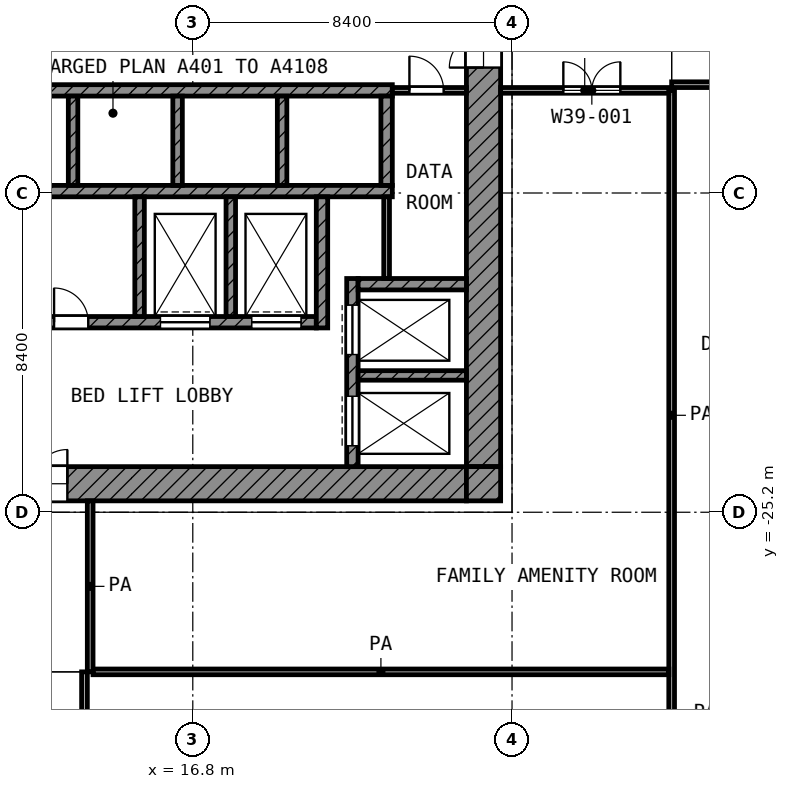
"""IFC4 building model, lengths in metres.
Left out: names, types, materials, properties, quantities, classifications, styles, units other than length and angle.
Written with IfcOpenShell. Run it as: python <this file> out.ifc"""

import sys

from ifc_helpers import new_model, si_unit, direction, frame, frame_2d, origin, place, context, subcontext, project, spatial, rectangle, extrude, element, fill, save


model = new_model("IFC4")
c1 = context("Model", 3, precision=1e-05, world=origin(), true_north=direction((0.0, 1.0)))
c2 = subcontext(c1, "Body", "Model", "MODEL_VIEW")
j1 = project(units=[si_unit("LENGTHUNIT", "METRE"), si_unit("PLANEANGLEUNIT", "RADIAN")], contexts=[c1])
p1 = place(None, origin())
s1 = spatial("IfcSite", under=j1, at=p1, CompositionType="ELEMENT")
p2 = place(p1, origin())
s2 = spatial("IfcBuilding", under=s1, at=p2, CompositionType="ELEMENT")
p3 = place(p2, frame((0.0, 0.0, 192.0)))
s3 = spatial("IfcBuildingStorey", under=s2, at=p3, CompositionType="ELEMENT", Elevation=192.0)
p4 = place(p3, frame((24.45, -24.0, 0.0), z_axis=(0.0, 0.0, 1.0), x_axis=(0.0, 1.0, 0.0)))
e1 = element("IfcWall", 1, at=p4, inside=s3, PredefinedType="SHEAR", context=c2, shape_type="SweptSolid", body=[
    extrude(rectangle(XDim=18.6, YDim=0.9, at=frame_2d((9.3, 0.0))), origin(), (0.0, 0.0, 1.0), 3.6),
])
p5 = place(p4, frame((10.5, 0.0, 0.0)))
e2 = element("IfcOpeningElement", 2, at=p5, cuts=e1, PredefinedType="OPENING", context=c2, shape_type="SweptSolid", body=[
    extrude(rectangle(XDim=1.8, YDim=2.1, at=frame_2d((0.9, 1.05))), frame((0.0, 0.46, 0.0), z_axis=(0.0, -1.0, 0.0), x_axis=(1.0, 0.0, 0.0)), (0.0, 0.0, 1.0), 0.92),
])
p6 = place(p3, frame((5.4, -24.45, 0.0), z_axis=(0.0, 0.0, 1.0), x_axis=(1.0, 0.0, 0.0)))
e3 = element("IfcWall", 3, at=p6, inside=s3, PredefinedType="SHEAR", context=c2, shape_type="SweptSolid", body=[
    extrude(rectangle(XDim=18.6, YDim=0.9, at=frame_2d((9.3, 0.0))), origin(), (0.0, 0.0, 1.0), 3.6),
])
p7 = place(p6, frame((6.3, 0.0, 0.0)))
e4 = element("IfcOpeningElement", 4, at=p7, cuts=e3, PredefinedType="OPENING", context=c2, shape_type="SweptSolid", body=[
    extrude(rectangle(XDim=1.8, YDim=2.1, at=frame_2d((0.9, 1.05))), frame((0.0, 0.46, 0.0), z_axis=(0.0, -1.0, 0.0), x_axis=(1.0, 0.0, 0.0)), (0.0, 0.0, 1.0), 0.92),
])
p8 = place(p3, frame((24.45, -24.9, 0.0), z_axis=(0.0, 0.0, 1.0), x_axis=(0.0, 1.0, 0.0)))
e5 = element("IfcWall", 5, at=p8, inside=s3, PredefinedType="SHEAR", context=c2, shape_type="SweptSolid", body=[
    extrude(rectangle(XDim=0.9, YDim=0.9, at=frame_2d((0.45, 0.0))), origin(), (0.0, 0.0, 1.0), 3.6),
])
p9 = place(p3, frame((5.4, -14.1, 0.0), z_axis=(0.0, 0.0, 1.0), x_axis=(1.0, 0.0, 0.0)))
e6 = element("IfcWall", 6, at=p9, inside=s3, PredefinedType="SHEAR", context=c2, shape_type="SweptSolid", body=[
    extrude(rectangle(XDim=16.65, YDim=0.3, at=frame_2d((8.325, 0.0))), origin(), (0.0, 0.0, 1.0), 3.6),
])
p10 = place(p9, frame((0.825, 0.0, 0.0)))
e7 = element("IfcOpeningElement", 7, at=p10, cuts=e6, PredefinedType="OPENING", context=c2, shape_type="SweptSolid", body=[
    extrude(rectangle(XDim=1.1, YDim=2.1, at=frame_2d((0.55, 1.05))), frame((0.0, 0.16, 0.0), z_axis=(0.0, -1.0, 0.0), x_axis=(1.0, 0.0, 0.0)), (0.0, 0.0, 1.0), 0.32),
])
p11 = place(p9, frame((3.575, 0.0, 0.0)))
e8 = element("IfcOpeningElement", 8, at=p11, cuts=e6, PredefinedType="OPENING", context=c2, shape_type="SweptSolid", body=[
    extrude(rectangle(XDim=1.1, YDim=2.1, at=frame_2d((0.55, 1.05))), frame((0.0, 0.16, 0.0), z_axis=(0.0, -1.0, 0.0), x_axis=(1.0, 0.0, 0.0)), (0.0, 0.0, 1.0), 0.32),
])
p12 = place(p3, frame((5.4, -16.75, 0.0), z_axis=(0.0, 0.0, 1.0), x_axis=(1.0, 0.0, 0.0)))
e9 = element("IfcWall", 9, at=p12, inside=s3, PredefinedType="SHEAR", context=c2, shape_type="SweptSolid", body=[
    extrude(rectangle(XDim=16.65, YDim=0.3, at=frame_2d((8.325, 0.0))), origin(), (0.0, 0.0, 1.0), 3.6),
])
p13 = place(p3, frame((5.4, -20.2, 0.0), z_axis=(0.0, 0.0, 1.0), x_axis=(1.0, 0.0, 0.0)))
e10 = element("IfcWall", 10, at=p13, inside=s3, PredefinedType="SHEAR", context=c2, shape_type="SweptSolid", body=[
    extrude(rectangle(XDim=14.65, YDim=0.3, at=frame_2d((7.325, 0.0))), origin(), (0.0, 0.0, 1.0), 3.6),
])
p14 = place(p13, frame((10.55, 0.0, 0.0)))
e11 = element("IfcOpeningElement", 11, at=p14, cuts=e10, PredefinedType="OPENING", context=c2, shape_type="SweptSolid", body=[
    extrude(rectangle(XDim=1.3, YDim=2.1, at=frame_2d((0.65, 1.05))), frame((0.0, 0.16, 0.0), z_axis=(0.0, -1.0, 0.0), x_axis=(1.0, 0.0, 0.0)), (0.0, 0.0, 1.0), 0.32),
])
p15 = place(p13, frame((12.95, 0.0, 0.0)))
e12 = element("IfcOpeningElement", 12, at=p15, cuts=e10, PredefinedType="OPENING", context=c2, shape_type="SweptSolid", body=[
    extrude(rectangle(XDim=1.3, YDim=2.1, at=frame_2d((0.65, 1.05))), frame((0.0, 0.16, 0.0), z_axis=(0.0, -1.0, 0.0), x_axis=(1.0, 0.0, 0.0)), (0.0, 0.0, 1.0), 0.32),
])
p16 = place(p13, frame((0.55, 0.0, 0.0)))
e13 = element("IfcOpeningElement", 13, at=p16, cuts=e10, PredefinedType="OPENING", context=c2, shape_type="SweptSolid", body=[
    extrude(rectangle(XDim=1.3, YDim=2.1, at=frame_2d((0.65, 1.05))), frame((0.0, 0.16, 0.0), z_axis=(0.0, -1.0, 0.0), x_axis=(1.0, 0.0, 0.0)), (0.0, 0.0, 1.0), 0.32),
])
p17 = place(p13, frame((2.95, 0.0, 0.0)))
e14 = element("IfcOpeningElement", 14, at=p17, cuts=e10, PredefinedType="OPENING", context=c2, shape_type="SweptSolid", body=[
    extrude(rectangle(XDim=1.3, YDim=2.1, at=frame_2d((0.65, 1.05))), frame((0.0, 0.16, 0.0), z_axis=(0.0, -1.0, 0.0), x_axis=(1.0, 0.0, 0.0)), (0.0, 0.0, 1.0), 0.32),
])
p18 = place(p13, frame((5.35, 0.0, 0.0)))
e15 = element("IfcOpeningElement", 15, at=p18, cuts=e10, PredefinedType="OPENING", context=c2, shape_type="SweptSolid", body=[
    extrude(rectangle(XDim=0.9, YDim=2.1, at=frame_2d((0.45, 1.05))), frame((0.0, 0.16, 0.0), z_axis=(0.0, -1.0, 0.0), x_axis=(1.0, 0.0, 0.0)), (0.0, 0.0, 1.0), 0.32),
])
p19 = place(p13, frame((7.75, 0.0, 0.0)))
e16 = element("IfcOpeningElement", 16, at=p19, cuts=e10, PredefinedType="OPENING", context=c2, shape_type="SweptSolid", body=[
    extrude(rectangle(XDim=0.9, YDim=2.1, at=frame_2d((0.45, 1.05))), frame((0.0, 0.16, 0.0), z_axis=(0.0, -1.0, 0.0), x_axis=(1.0, 0.0, 0.0)), (0.0, 0.0, 1.0), 0.32),
])
p20 = place(p3, frame((20.2, -20.35, 0.0), z_axis=(0.0, 0.0, 1.0), x_axis=(0.0, 1.0, 0.0)))
e17 = element("IfcWall", 17, at=p20, inside=s3, PredefinedType="SHEAR", context=c2, shape_type="SweptSolid", body=[
    extrude(rectangle(XDim=3.45, YDim=0.3, at=frame_2d((1.725, 0.0))), origin(), (0.0, 0.0, 1.0), 3.6),
])
p21 = place(p3, frame((21.9, -16.6, 0.0), z_axis=(0.0, 0.0, 1.0), x_axis=(0.0, 1.0, 0.0)))
e18 = element("IfcWall", 18, at=p21, inside=s3, PredefinedType="SHEAR", context=c2, shape_type="SweptSolid", body=[
    extrude(rectangle(XDim=2.35, YDim=0.3, at=frame_2d((1.175, 0.0))), origin(), (0.0, 0.0, 1.0), 3.6),
])
p22 = place(p3, frame((21.15, -19.2, 0.0), z_axis=(0.0, 0.0, 1.0), x_axis=(1.0, 0.0, 0.0)))
e19 = element("IfcWall", 19, at=p22, inside=s3, PredefinedType="SHEAR", context=c2, shape_type="SweptSolid", body=[
    extrude(rectangle(XDim=2.85, YDim=0.3, at=frame_2d((1.425, 0.0))), origin(), (0.0, 0.0, 1.0), 3.6),
])
p23 = place(p3, frame((21.0, -24.0, 0.0), z_axis=(0.0, 0.0, 1.0), x_axis=(0.0, 1.0, 0.0)))
e20 = element("IfcWall", 20, at=p23, inside=s3, PredefinedType="SHEAR", context=c2, shape_type="SweptSolid", body=[
    extrude(rectangle(XDim=4.95, YDim=0.3, at=frame_2d((2.475, 0.0))), origin(), (0.0, 0.0, 1.0), 3.6),
])
p24 = place(p23, frame((2.95, 0.0, 0.0)))
e21 = element("IfcOpeningElement", 21, at=p24, cuts=e20, PredefinedType="OPENING", context=c2, shape_type="SweptSolid", body=[
    extrude(rectangle(XDim=1.3, YDim=2.1, at=frame_2d((0.65, 1.05))), frame((0.0, 0.16, 0.0), z_axis=(0.0, -1.0, 0.0), x_axis=(1.0, 0.0, 0.0)), (0.0, 0.0, 1.0), 0.32),
])
p25 = place(p23, frame((0.55, 0.0, 0.0)))
e22 = element("IfcOpeningElement", 22, at=p25, cuts=e20, PredefinedType="OPENING", context=c2, shape_type="SweptSolid", body=[
    extrude(rectangle(XDim=1.3, YDim=2.1, at=frame_2d((0.65, 1.05))), frame((0.0, 0.16, 0.0), z_axis=(0.0, -1.0, 0.0), x_axis=(1.0, 0.0, 0.0)), (0.0, 0.0, 1.0), 0.32),
])
p26 = place(p3, frame((21.15, -21.6, 0.0), z_axis=(0.0, 0.0, 1.0), x_axis=(1.0, 0.0, 0.0)))
e23 = element("IfcWall", 23, at=p26, inside=s3, PredefinedType="SHEAR", context=c2, shape_type="SweptSolid", body=[
    extrude(rectangle(XDim=2.85, YDim=0.25, at=frame_2d((1.425, 0.0))), origin(), (0.0, 0.0, 1.0), 3.6),
])
for number, where, z_axis, x_axis in (
    (24, (15.4, -20.05, 0.0), (0.0, 0.0, 1.0), (0.0, 1.0, 0.0)),
    (25, (17.8, -20.05, 0.0), (0.0, 0.0, 1.0), (0.0, 1.0, 0.0)),
):
    element("IfcWall", number, at=place(p3, frame(where, z_axis=z_axis, x_axis=x_axis)), inside=s3, PredefinedType="SHEAR", context=c2, shape_type="SweptSolid", body=[
        extrude(rectangle(XDim=3.15, YDim=0.25, at=frame_2d((1.575, 0.0))), origin(), (0.0, 0.0, 1.0), 3.6),
    ])
for number, where, z_axis, x_axis in (
    (26, (13.65, -16.6, 0.0), (0.0, 0.0, 1.0), (0.0, 1.0, 0.0)),
    (27, (16.4, -16.6, 0.0), (0.0, 0.0, 1.0), (0.0, 1.0, 0.0)),
    (28, (19.15, -16.6, 0.0), (0.0, 0.0, 1.0), (0.0, 1.0, 0.0)),
):
    element("IfcWall", number, at=place(p3, frame(where, z_axis=z_axis, x_axis=x_axis)), inside=s3, PredefinedType="SHEAR", context=c2, shape_type="SweptSolid", body=[
        extrude(rectangle(XDim=2.35, YDim=0.25, at=frame_2d((1.175, 0.0))), origin(), (0.0, 0.0, 1.0), 3.6),
    ])
p27 = place(p3, frame((21.9, -19.05, 0.0), z_axis=(0.0, 0.0, 1.0), x_axis=(0.0, 1.0, 0.0)))
e29 = element("IfcWall", 29, at=p27, inside=s3, PredefinedType="PARTITIONING", context=c2, shape_type="SweptSolid", body=[
    extrude(rectangle(XDim=2.15, YDim=0.15, at=frame_2d((1.075, 0.0))), origin(), (0.0, 0.0, 1.0), 3.6),
])
p28 = place(p3, frame((22.05, -14.1, 0.0), z_axis=(0.0, 0.0, 1.0), x_axis=(1.0, 0.0, 0.0)))
e30 = element("IfcWall", 30, at=p28, inside=s3, PredefinedType="PARTITIONING", context=c2, shape_type="SweptSolid", body=[
    extrude(rectangle(XDim=1.95, YDim=0.15, at=frame_2d((0.975, 0.0))), origin(), (0.0, 0.0, 1.0), 3.6),
])
p29 = place(p28, frame((0.45, 0.0, 0.0)))
e31 = element("IfcOpeningElement", 31, at=p29, cuts=e30, PredefinedType="OPENING", context=c2, shape_type="SweptSolid", body=[
    extrude(rectangle(XDim=0.9, YDim=2.1, at=frame_2d((0.45, 1.05))), frame((0.0, 0.085, 0.0), z_axis=(0.0, -1.0, 0.0), x_axis=(1.0, 0.0, 0.0)), (0.0, 0.0, 1.0), 0.17),
])
p30 = place(p3, frame((14.175, -29.4, 0.0), z_axis=(0.0, 0.0, 1.0), x_axis=(1.0, 0.0, 0.0)))
e32 = element("IfcWall", 32, at=p30, inside=s3, PredefinedType="PARTITIONING", context=c2, shape_type="SweptSolid", body=[
    extrude(rectangle(XDim=15.15, YDim=0.15, at=frame_2d((7.575, 0.0))), origin(), (0.0, 0.0, 1.0), 3.6),
])
p31 = place(p3, frame((24.9, -14.1, 0.0), z_axis=(0.0, 0.0, 1.0), x_axis=(1.0, 0.0, 0.0)))
e33 = element("IfcWall", 33, at=p31, inside=s3, PredefinedType="PARTITIONING", context=c2, shape_type="SweptSolid", body=[
    extrude(rectangle(XDim=4.425, YDim=0.15, at=frame_2d((2.212, 0.0))), origin(), (0.0, 0.0, 1.0), 3.6),
])
p32 = place(p31, frame((1.65, 0.0, 0.0)))
e34 = element("IfcOpeningElement", 34, at=p32, cuts=e33, PredefinedType="OPENING", context=c2, shape_type="SweptSolid", body=[
    extrude(rectangle(XDim=1.5, YDim=2.1, at=frame_2d((0.75, 1.05))), frame((0.0, 0.085, 0.0), z_axis=(0.0, -1.0, 0.0), x_axis=(1.0, 0.0, 0.0)), (0.0, 0.0, 1.0), 0.17),
])
p33 = place(p3, frame((29.4, -13.95, 0.0), z_axis=(0.0, 0.0, 1.0), x_axis=(1.0, 0.0, 0.0)))
e35 = element("IfcWall", 35, at=p33, inside=s3, PredefinedType="PARTITIONING", context=c2, shape_type="SweptSolid", body=[
    extrude(rectangle(XDim=37.72, YDim=0.15, at=frame_2d((18.86, 0.0))), origin(), (0.0, 0.0, 1.0), 3.6),
])
p34 = place(p33, frame((1.6, 0.0, 0.0)))
e36 = element("IfcOpeningElement", 36, at=p34, cuts=e35, PredefinedType="OPENING", context=c2, shape_type="SweptSolid", body=[
    extrude(rectangle(XDim=1.0, YDim=2.1, at=frame_2d((0.5, 1.05))), frame((0.0, 0.085, 0.0), z_axis=(0.0, -1.0, 0.0), x_axis=(1.0, 0.0, 0.0)), (0.0, 0.0, 1.0), 0.17),
])
p35 = place(p33, frame((5.55, 0.0, 0.0)))
e37 = element("IfcOpeningElement", 37, at=p35, cuts=e35, PredefinedType="OPENING", context=c2, shape_type="SweptSolid", body=[
    extrude(rectangle(XDim=1.2, YDim=2.1, at=frame_2d((0.6, 1.05))), frame((0.0, 0.085, 0.0), z_axis=(0.0, -1.0, 0.0), x_axis=(1.0, 0.0, 0.0)), (0.0, 0.0, 1.0), 0.17),
])
p36 = place(p33, frame((11.2, 0.0, 0.0)))
e38 = element("IfcOpeningElement", 38, at=p36, cuts=e35, PredefinedType="OPENING", context=c2, shape_type="SweptSolid", body=[
    extrude(rectangle(XDim=1.2, YDim=2.1, at=frame_2d((0.6, 1.05))), frame((0.0, 0.085, 0.0), z_axis=(0.0, -1.0, 0.0), x_axis=(1.0, 0.0, 0.0)), (0.0, 0.0, 1.0), 0.17),
])
p37 = place(p33, frame((14.35, 0.0, 0.0)))
e39 = element("IfcOpeningElement", 39, at=p37, cuts=e35, PredefinedType="OPENING", context=c2, shape_type="SweptSolid", body=[
    extrude(rectangle(XDim=1.0, YDim=2.1, at=frame_2d((0.5, 1.05))), frame((0.0, 0.085, 0.0), z_axis=(0.0, -1.0, 0.0), x_axis=(1.0, 0.0, 0.0)), (0.0, 0.0, 1.0), 0.17),
])
p38 = place(p33, frame((19.6, 0.0, 0.0)))
e40 = element("IfcOpeningElement", 40, at=p38, cuts=e35, PredefinedType="OPENING", context=c2, shape_type="SweptSolid", body=[
    extrude(rectangle(XDim=1.2, YDim=2.1, at=frame_2d((0.6, 1.05))), frame((0.0, 0.085, 0.0), z_axis=(0.0, -1.0, 0.0), x_axis=(1.0, 0.0, 0.0)), (0.0, 0.0, 1.0), 0.17),
])
p39 = place(p33, frame((21.2, 0.0, 0.0)))
e41 = element("IfcOpeningElement", 41, at=p39, cuts=e35, PredefinedType="OPENING", context=c2, shape_type="SweptSolid", body=[
    extrude(rectangle(XDim=1.1, YDim=2.1, at=frame_2d((0.55, 1.05))), frame((0.0, 0.085, 0.0), z_axis=(0.0, -1.0, 0.0), x_axis=(1.0, 0.0, 0.0)), (0.0, 0.0, 1.0), 0.17),
])
p40 = place(p33, frame((27.9, 0.0, 0.0)))
e42 = element("IfcOpeningElement", 42, at=p40, cuts=e35, PredefinedType="OPENING", context=c2, shape_type="SweptSolid", body=[
    extrude(rectangle(XDim=1.2, YDim=2.1, at=frame_2d((0.6, 1.05))), frame((0.0, 0.085, 0.0), z_axis=(0.0, -1.0, 0.0), x_axis=(1.0, 0.0, 0.0)), (0.0, 0.0, 1.0), 0.17),
])
p41 = place(p33, frame((31.0, 0.0, 0.0)))
e43 = element("IfcOpeningElement", 43, at=p41, cuts=e35, PredefinedType="OPENING", context=c2, shape_type="SweptSolid", body=[
    extrude(rectangle(XDim=1.0, YDim=2.1, at=frame_2d((0.5, 1.05))), frame((0.0, 0.085, 0.0), z_axis=(0.0, -1.0, 0.0), x_axis=(1.0, 0.0, 0.0)), (0.0, 0.0, 1.0), 0.17),
])
p42 = place(p33, frame((35.2, 0.0, 0.0)))
e44 = element("IfcOpeningElement", 44, at=p42, cuts=e35, PredefinedType="OPENING", context=c2, shape_type="SweptSolid", body=[
    extrude(rectangle(XDim=1.0, YDim=2.1, at=frame_2d((0.5, 1.05))), frame((0.0, 0.085, 0.0), z_axis=(0.0, -1.0, 0.0), x_axis=(1.0, 0.0, 0.0)), (0.0, 0.0, 1.0), 0.17),
])
p43 = place(p3, frame((13.95, -54.52, 0.0), z_axis=(0.0, 0.0, 1.0), x_axis=(0.0, 1.0, 0.0)))
e45 = element("IfcWall", 45, at=p43, inside=s3, PredefinedType="PARTITIONING", context=c2, shape_type="SweptSolid", body=[
    extrude(rectangle(XDim=25.12, YDim=0.15, at=frame_2d((12.56, 0.0))), origin(), (0.0, 0.0, 1.0), 3.6),
])
p44 = place(p43, frame((22.52, 0.0, 0.0)))
e46 = element("IfcOpeningElement", 46, at=p44, cuts=e45, PredefinedType="OPENING", context=c2, shape_type="SweptSolid", body=[
    extrude(rectangle(XDim=1.0, YDim=2.1, at=frame_2d((0.5, 1.05))), frame((0.0, 0.085, 0.0), z_axis=(0.0, -1.0, 0.0), x_axis=(1.0, 0.0, 0.0)), (0.0, 0.0, 1.0), 0.17),
])
p45 = place(p43, frame((18.37, 0.0, 0.0)))
e47 = element("IfcOpeningElement", 47, at=p45, cuts=e45, PredefinedType="OPENING", context=c2, shape_type="SweptSolid", body=[
    extrude(rectangle(XDim=1.2, YDim=2.1, at=frame_2d((0.6, 1.05))), frame((0.0, 0.085, 0.0), z_axis=(0.0, -1.0, 0.0), x_axis=(1.0, 0.0, 0.0)), (0.0, 0.0, 1.0), 0.17),
])
p46 = place(p43, frame((13.52, 0.0, 0.0)))
e48 = element("IfcOpeningElement", 48, at=p46, cuts=e45, PredefinedType="OPENING", context=c2, shape_type="SweptSolid", body=[
    extrude(rectangle(XDim=1.2, YDim=2.1, at=frame_2d((0.6, 1.05))), frame((0.0, 0.085, 0.0), z_axis=(0.0, -1.0, 0.0), x_axis=(1.0, 0.0, 0.0)), (0.0, 0.0, 1.0), 0.17),
])
p47 = place(p43, frame((11.12, 0.0, 0.0)))
e49 = element("IfcOpeningElement", 49, at=p47, cuts=e45, PredefinedType="OPENING", context=c2, shape_type="SweptSolid", body=[
    extrude(rectangle(XDim=1.2, YDim=2.1, at=frame_2d((0.6, 1.05))), frame((0.0, 0.085, 0.0), z_axis=(0.0, -1.0, 0.0), x_axis=(1.0, 0.0, 0.0)), (0.0, 0.0, 1.0), 0.17),
])
p48 = place(p43, frame((3.22, 0.0, 0.0)))
e50 = element("IfcOpeningElement", 50, at=p48, cuts=e45, PredefinedType="OPENING", context=c2, shape_type="SweptSolid", body=[
    extrude(rectangle(XDim=1.5, YDim=2.1, at=frame_2d((0.75, 1.05))), frame((0.0, 0.085, 0.0), z_axis=(0.0, -1.0, 0.0), x_axis=(1.0, 0.0, 0.0)), (0.0, 0.0, 1.0), 0.17),
])
p49 = place(p3, frame((14.1, -29.4, 0.0), z_axis=(0.0, 0.0, 1.0), x_axis=(0.0, 1.0, 0.0)))
e51 = element("IfcWall", 51, at=p49, inside=s3, PredefinedType="PARTITIONING", context=c2, shape_type="SweptSolid", body=[
    extrude(rectangle(XDim=4.5, YDim=0.15, at=frame_2d((2.25, 0.0))), origin(), (0.0, 0.0, 1.0), 3.6),
])
p50 = place(p3, frame((29.4, -31.198, 0.0), z_axis=(0.0, 0.0, 1.0), x_axis=(0.0, 1.0, 0.0)))
e52 = element("IfcWall", 52, at=p50, inside=s3, PredefinedType="PARTITIONING", context=c2, shape_type="SweptSolid", body=[
    extrude(rectangle(XDim=17.098, YDim=0.15, at=frame_2d((8.549, 0.0))), origin(), (0.0, 0.0, 1.0), 3.6),
])
p51 = place(p24, origin())
e53 = element("IfcDoor", 53, at=p51, inside=s3, OperationType="DOUBLE_DOOR_SLIDING", PredefinedType="DOOR", context=c2, shape_type="SweptSolid", body=[
    extrude(rectangle(XDim=1.3, YDim=2.1, at=frame_2d((0.65, 1.05))), frame((0.0, 0.025, 0.0), z_axis=(0.0, -1.0, 0.0), x_axis=(1.0, 0.0, 0.0)), (0.0, 0.0, 1.0), 0.05),
])
fill(e21, e53)
p52 = place(p25, origin())
e54 = element("IfcDoor", 54, at=p52, inside=s3, OperationType="DOUBLE_DOOR_SLIDING", PredefinedType="DOOR", context=c2, shape_type="SweptSolid", body=[
    extrude(rectangle(XDim=1.3, YDim=2.1, at=frame_2d((0.65, 1.05))), frame((0.0, 0.025, 0.0), z_axis=(0.0, -1.0, 0.0), x_axis=(1.0, 0.0, 0.0)), (0.0, 0.0, 1.0), 0.05),
])
fill(e22, e54)
p53 = place(p14, origin())
e55 = element("IfcDoor", 55, at=p53, inside=s3, OperationType="DOUBLE_DOOR_SLIDING", PredefinedType="DOOR", context=c2, shape_type="SweptSolid", body=[
    extrude(rectangle(XDim=1.3, YDim=2.1, at=frame_2d((0.65, 1.05))), frame((0.0, 0.025, 0.0), z_axis=(0.0, -1.0, 0.0), x_axis=(1.0, 0.0, 0.0)), (0.0, 0.0, 1.0), 0.05),
])
fill(e11, e55)
p54 = place(p15, origin())
e56 = element("IfcDoor", 56, at=p54, inside=s3, OperationType="DOUBLE_DOOR_SLIDING", PredefinedType="DOOR", context=c2, shape_type="SweptSolid", body=[
    extrude(rectangle(XDim=1.3, YDim=2.1, at=frame_2d((0.65, 1.05))), frame((0.0, 0.025, 0.0), z_axis=(0.0, -1.0, 0.0), x_axis=(1.0, 0.0, 0.0)), (0.0, 0.0, 1.0), 0.05),
])
fill(e12, e56)
p55 = place(p5, origin())
e57 = element("IfcDoor", 57, at=p55, inside=s3, OperationType="DOUBLE_DOOR_SINGLE_SWING", PredefinedType="DOOR", context=c2, shape_type="SweptSolid", body=[
    extrude(rectangle(XDim=1.8, YDim=2.1, at=frame_2d((0.9, 1.05))), frame((0.0, 0.025, 0.0), z_axis=(0.0, -1.0, 0.0), x_axis=(1.0, 0.0, 0.0)), (0.0, 0.0, 1.0), 0.05),
])
fill(e2, e57)
p56 = place(p7, origin())
e58 = element("IfcDoor", 58, at=p56, inside=s3, OperationType="DOUBLE_DOOR_SINGLE_SWING", PredefinedType="DOOR", context=c2, shape_type="SweptSolid", body=[
    extrude(rectangle(XDim=1.8, YDim=2.1, at=frame_2d((0.9, 1.05))), frame((0.0, 0.025, 0.0), z_axis=(0.0, -1.0, 0.0), x_axis=(1.0, 0.0, 0.0)), (0.0, 0.0, 1.0), 0.05),
])
fill(e4, e58)
p57 = place(p29, origin())
e59 = element("IfcDoor", 59, at=p57, inside=s3, OperationType="SINGLE_SWING_LEFT", PredefinedType="DOOR", context=c2, shape_type="SweptSolid", body=[
    extrude(rectangle(XDim=0.9, YDim=2.1, at=frame_2d((0.45, 1.05))), frame((0.0, 0.025, 0.0), z_axis=(0.0, -1.0, 0.0), x_axis=(1.0, 0.0, 0.0)), (0.0, 0.0, 1.0), 0.05),
])
fill(e31, e59)
p58 = place(p19, origin())
e60 = element("IfcDoor", 60, at=p58, inside=s3, OperationType="SINGLE_SWING_LEFT", PredefinedType="DOOR", context=c2, shape_type="SweptSolid", body=[
    extrude(rectangle(XDim=0.9, YDim=2.1, at=frame_2d((0.45, 1.05))), frame((0.0, 0.025, 0.0), z_axis=(0.0, -1.0, 0.0), x_axis=(1.0, 0.0, 0.0)), (0.0, 0.0, 1.0), 0.05),
])
fill(e16, e60)
p59 = place(p32, origin())
e61 = element("IfcDoor", 61, at=p59, inside=s3, OperationType="DOUBLE_DOOR_SINGLE_SWING", PredefinedType="DOOR", context=c2, shape_type="SweptSolid", body=[
    extrude(rectangle(XDim=1.5, YDim=2.1, at=frame_2d((0.75, 1.05))), frame((0.0, 0.025, 0.0), z_axis=(0.0, -1.0, 0.0), x_axis=(1.0, 0.0, 0.0)), (0.0, 0.0, 1.0), 0.05),
])
fill(e34, e61)
save(model, sys.argv[1])
